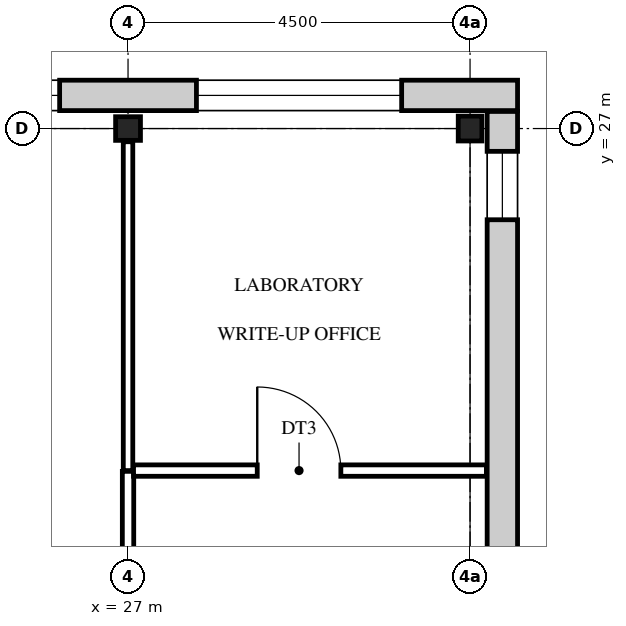
"""IFC4 building model, lengths in metres.
Left out: names, types, materials, properties, quantities, classifications, styles, units other than length and angle.
Written with IfcOpenShell. Run it as: python <this file> out.ifc"""

import sys

from ifc_helpers import new_model, si_unit, direction, frame, frame_2d, origin, origin_2d, place, context, subcontext, project, spatial, rectangle, i_section, extrude, element, fill, save


model = new_model("IFC4")
c1 = context("Model", 3, precision=1e-05, world=origin(), true_north=direction((0.0, 1.0)))
c2 = subcontext(c1, "Body", "Model", "MODEL_VIEW")
j1 = project(units=[si_unit("LENGTHUNIT", "METRE"), si_unit("PLANEANGLEUNIT", "RADIAN")], contexts=[c1])
p1 = place(None, origin())
s1 = spatial("IfcSite", under=j1, at=p1, CompositionType="ELEMENT")
p2 = place(p1, origin())
s2 = spatial("IfcBuilding", under=s1, at=p2, CompositionType="ELEMENT")
p3 = place(p2, frame((0.0, 0.0, 23.4)))
s3 = spatial("IfcBuildingStorey", under=s2, at=p3, CompositionType="ELEMENT", Elevation=23.4)
for number, where, z_axis, x_axis in (
    (1, (27.0, 27.0, 0.0), (0.0, 0.0, 1.0), (0.0, 1.0, 0.0)),
    (2, (31.5, 27.0, 0.0), (0.0, 0.0, 1.0), (1.0, 0.0, 0.0)),
):
    element("IfcColumn", number, at=place(p3, frame(where, z_axis=z_axis, x_axis=x_axis)), inside=s3, PredefinedType="COLUMN", context=c2, shape_type="SweptSolid", body=[
        extrude(i_section(OverallWidth=0.311, OverallDepth=0.327, WebThickness=0.016, FlangeThickness=0.025, FilletRadius=0.017, at=origin_2d()), origin(), (0.0, 0.0, 1.0), 4.2),
    ])
p4 = place(p3, frame((-0.625, 27.436, 0.0), z_axis=(0.0, 0.0, 1.0), x_axis=(1.0, 0.0, 0.0)))
e3 = element("IfcWall", 3, at=p4, inside=s3, PredefinedType="STANDARD", context=c2, shape_type="SweptSolid", body=[
    extrude(rectangle(XDim=32.75, YDim=0.4, at=frame_2d((16.375, 0.0))), origin(), (0.0, 0.0, 1.0), 4.2),
])
p5 = place(p4, frame((1.525, 0.0, 0.9)))
e4 = element("IfcOpeningElement", 4, at=p5, cuts=e3, PredefinedType="OPENING", context=c2, shape_type="SweptSolid", body=[
    extrude(rectangle(XDim=2.7, YDim=2.5, at=frame_2d((1.35, 1.25))), frame((0.0, 0.21, 0.0), z_axis=(0.0, -1.0, 0.0), x_axis=(1.0, 0.0, 0.0)), (0.0, 0.0, 1.0), 0.42),
])
p6 = place(p4, frame((6.025, 0.0, 0.9)))
e5 = element("IfcOpeningElement", 5, at=p6, cuts=e3, PredefinedType="OPENING", context=c2, shape_type="SweptSolid", body=[
    extrude(rectangle(XDim=2.7, YDim=2.5, at=frame_2d((1.35, 1.25))), frame((0.0, 0.21, 0.0), z_axis=(0.0, -1.0, 0.0), x_axis=(1.0, 0.0, 0.0)), (0.0, 0.0, 1.0), 0.42),
])
p7 = place(p4, frame((10.525, 0.0, 0.9)))
e6 = element("IfcOpeningElement", 6, at=p7, cuts=e3, PredefinedType="OPENING", context=c2, shape_type="SweptSolid", body=[
    extrude(rectangle(XDim=2.7, YDim=2.5, at=frame_2d((1.35, 1.25))), frame((0.0, 0.21, 0.0), z_axis=(0.0, -1.0, 0.0), x_axis=(1.0, 0.0, 0.0)), (0.0, 0.0, 1.0), 0.42),
])
p8 = place(p4, frame((15.025, 0.0, 0.9)))
e7 = element("IfcOpeningElement", 7, at=p8, cuts=e3, PredefinedType="OPENING", context=c2, shape_type="SweptSolid", body=[
    extrude(rectangle(XDim=2.7, YDim=2.5, at=frame_2d((1.35, 1.25))), frame((0.0, 0.21, 0.0), z_axis=(0.0, -1.0, 0.0), x_axis=(1.0, 0.0, 0.0)), (0.0, 0.0, 1.0), 0.42),
])
p9 = place(p4, frame((19.525, 0.0, 0.9)))
e8 = element("IfcOpeningElement", 8, at=p9, cuts=e3, PredefinedType="OPENING", context=c2, shape_type="SweptSolid", body=[
    extrude(rectangle(XDim=2.7, YDim=2.5, at=frame_2d((1.35, 1.25))), frame((0.0, 0.21, 0.0), z_axis=(0.0, -1.0, 0.0), x_axis=(1.0, 0.0, 0.0)), (0.0, 0.0, 1.0), 0.42),
])
p10 = place(p4, frame((24.025, 0.0, 0.9)))
e9 = element("IfcOpeningElement", 9, at=p10, cuts=e3, PredefinedType="OPENING", context=c2, shape_type="SweptSolid", body=[
    extrude(rectangle(XDim=2.7, YDim=2.5, at=frame_2d((1.35, 1.25))), frame((0.0, 0.21, 0.0), z_axis=(0.0, -1.0, 0.0), x_axis=(1.0, 0.0, 0.0)), (0.0, 0.0, 1.0), 0.42),
])
p11 = place(p4, frame((28.525, 0.0, 0.9)))
e10 = element("IfcOpeningElement", 10, at=p11, cuts=e3, PredefinedType="OPENING", context=c2, shape_type="SweptSolid", body=[
    extrude(rectangle(XDim=2.7, YDim=2.5, at=frame_2d((1.35, 1.25))), frame((0.0, 0.21, 0.0), z_axis=(0.0, -1.0, 0.0), x_axis=(1.0, 0.0, 0.0)), (0.0, 0.0, 1.0), 0.42),
])
p12 = place(p3, frame((31.925, 27.225, 0.0), z_axis=(0.0, 0.0, 1.0), x_axis=(0.0, -1.0, 0.0)))
e11 = element("IfcWall", 11, at=p12, inside=s3, PredefinedType="STANDARD", context=c2, shape_type="SweptSolid", body=[
    extrude(rectangle(XDim=27.45, YDim=0.4, at=frame_2d((13.725, 0.0))), origin(), (0.0, 0.0, 1.0), 4.2),
])
p13 = place(p12, frame((26.025, 0.0, 0.9)))
e12 = element("IfcOpeningElement", 12, at=p13, cuts=e11, PredefinedType="OPENING", context=c2, shape_type="SweptSolid", body=[
    extrude(rectangle(XDim=0.9, YDim=2.0, at=frame_2d((0.45, 1.0))), frame((0.0, 0.21, 0.0), z_axis=(0.0, -1.0, 0.0), x_axis=(1.0, 0.0, 0.0)), (0.0, 0.0, 1.0), 0.42),
])
p14 = place(p12, frame((18.525, 0.0, 0.9)))
e13 = element("IfcOpeningElement", 13, at=p14, cuts=e11, PredefinedType="OPENING", context=c2, shape_type="SweptSolid", body=[
    extrude(rectangle(XDim=0.9, YDim=2.0, at=frame_2d((0.45, 1.0))), frame((0.0, 0.21, 0.0), z_axis=(0.0, -1.0, 0.0), x_axis=(1.0, 0.0, 0.0)), (0.0, 0.0, 1.0), 0.42),
])
p15 = place(p12, frame((15.675, 0.0, 1.6)))
e14 = element("IfcOpeningElement", 14, at=p15, cuts=e11, PredefinedType="OPENING", context=c2, shape_type="SweptSolid", body=[
    extrude(rectangle(XDim=0.6, YDim=0.9, at=frame_2d((0.3, 0.45))), frame((0.0, 0.21, 0.0), z_axis=(0.0, -1.0, 0.0), x_axis=(1.0, 0.0, 0.0)), (0.0, 0.0, 1.0), 0.42),
])
p16 = place(p12, frame((11.175, 0.0, 1.6)))
e15 = element("IfcOpeningElement", 15, at=p16, cuts=e11, PredefinedType="OPENING", context=c2, shape_type="SweptSolid", body=[
    extrude(rectangle(XDim=0.6, YDim=0.9, at=frame_2d((0.3, 0.45))), frame((0.0, 0.21, 0.0), z_axis=(0.0, -1.0, 0.0), x_axis=(1.0, 0.0, 0.0)), (0.0, 0.0, 1.0), 0.42),
])
p17 = place(p12, frame((8.025, 0.0, 0.9)))
e16 = element("IfcOpeningElement", 16, at=p17, cuts=e11, PredefinedType="OPENING", context=c2, shape_type="SweptSolid", body=[
    extrude(rectangle(XDim=0.9, YDim=2.0, at=frame_2d((0.45, 1.0))), frame((0.0, 0.21, 0.0), z_axis=(0.0, -1.0, 0.0), x_axis=(1.0, 0.0, 0.0)), (0.0, 0.0, 1.0), 0.42),
])
p18 = place(p12, frame((0.525, 0.0, 0.9)))
e17 = element("IfcOpeningElement", 17, at=p18, cuts=e11, PredefinedType="OPENING", context=c2, shape_type="SweptSolid", body=[
    extrude(rectangle(XDim=0.9, YDim=2.0, at=frame_2d((0.45, 1.0))), frame((0.0, 0.21, 0.0), z_axis=(0.0, -1.0, 0.0), x_axis=(1.0, 0.0, 0.0)), (0.0, 0.0, 1.0), 0.42),
])
p19 = place(p3, frame((27.0, 20.185, 0.0), z_axis=(0.0, 0.0, 1.0), x_axis=(0.0, 1.0, 0.0)))
e18 = element("IfcWall", 18, at=p19, inside=s3, PredefinedType="PARTITIONING", context=c2, shape_type="SweptSolid", body=[
    extrude(rectangle(XDim=2.305, YDim=0.15, at=frame_2d((1.152, 0.0))), origin(), (0.0, 0.0, 1.0), 3.537),
])
p20 = place(p3, frame((27.0, 22.5, 0.0), z_axis=(0.0, 0.0, 1.0), x_axis=(0.0, 1.0, 0.0)))
e19 = element("IfcWall", 19, at=p20, inside=s3, PredefinedType="PARTITIONING", context=c2, shape_type="SweptSolid", body=[
    extrude(rectangle(XDim=4.326, YDim=0.125, at=frame_2d((2.163, 0.0))), origin(), (0.0, 0.0, 1.0), 3.537),
])
p21 = place(p3, frame((27.073, 22.5, 0.0), z_axis=(0.0, 0.0, 1.0), x_axis=(1.0, 0.0, 0.0)))
e20 = element("IfcWall", 20, at=p21, inside=s3, PredefinedType="PARTITIONING", context=c2, shape_type="SweptSolid", body=[
    extrude(rectangle(XDim=4.643, YDim=0.15, at=frame_2d((2.321, 0.0))), origin(), (0.0, 0.0, 1.0), 3.537),
])
p22 = place(p21, frame((1.627, 0.0, 0.0)))
e21 = element("IfcOpeningElement", 21, at=p22, cuts=e20, PredefinedType="OPENING", context=c2, shape_type="SweptSolid", body=[
    extrude(rectangle(XDim=1.1, YDim=2.1, at=frame_2d((0.55, 1.05))), frame((0.0, 0.085, 0.0), z_axis=(0.0, -1.0, 0.0), x_axis=(1.0, 0.0, 0.0)), (0.0, 0.0, 1.0), 0.17),
])
p23 = place(p10, origin())
e22 = element("IfcWindow", 22, at=p23, inside=s3, PartitioningType="SINGLE_PANEL", PredefinedType="WINDOW", context=c2, shape_type="SweptSolid", body=[
    extrude(rectangle(XDim=2.7, YDim=2.5, at=frame_2d((1.35, 1.25))), frame((0.0, 0.03, 0.0), z_axis=(0.0, -1.0, 0.0), x_axis=(1.0, 0.0, 0.0)), (0.0, 0.0, 1.0), 0.06),
])
fill(e9, e22)
p24 = place(p11, origin())
e23 = element("IfcWindow", 23, at=p24, inside=s3, PartitioningType="SINGLE_PANEL", PredefinedType="WINDOW", context=c2, shape_type="SweptSolid", body=[
    extrude(rectangle(XDim=2.7, YDim=2.5, at=frame_2d((1.35, 1.25))), frame((0.0, 0.03, 0.0), z_axis=(0.0, -1.0, 0.0), x_axis=(1.0, 0.0, 0.0)), (0.0, 0.0, 1.0), 0.06),
])
fill(e10, e23)
p25 = place(p18, origin())
e24 = element("IfcWindow", 24, at=p25, inside=s3, PartitioningType="SINGLE_PANEL", PredefinedType="WINDOW", context=c2, shape_type="SweptSolid", body=[
    extrude(rectangle(XDim=0.9, YDim=2.0, at=frame_2d((0.45, 1.0))), frame((0.0, 0.03, 0.0), z_axis=(0.0, -1.0, 0.0), x_axis=(1.0, 0.0, 0.0)), (0.0, 0.0, 1.0), 0.06),
])
fill(e17, e24)
p26 = place(p22, origin())
e25 = element("IfcDoor", 25, at=p26, inside=s3, OperationType="SINGLE_SWING_LEFT", PredefinedType="DOOR", context=c2, shape_type="SweptSolid", body=[
    extrude(rectangle(XDim=1.1, YDim=2.1, at=frame_2d((0.55, 1.05))), frame((0.0, 0.025, 0.0), z_axis=(0.0, -1.0, 0.0), x_axis=(1.0, 0.0, 0.0)), (0.0, 0.0, 1.0), 0.05),
])
fill(e21, e25)
save(model, sys.argv[1])
